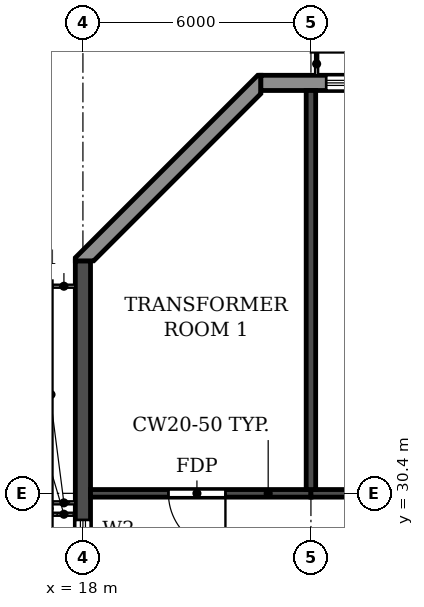
"""IFC4 building model, lengths in metres.
Left out: names, types, materials, properties, quantities, classifications, styles, units other than length and angle.
Written with IfcOpenShell. Run it as: python <this file> out.ifc"""

import sys

from ifc_helpers import new_model, si_unit, direction, frame, frame_2d, origin, place, context, subcontext, project, spatial, polyline, rectangle, outline, extrude, element, fill, save


model = new_model("IFC4")
c1 = context("Model", 3, precision=1e-05, world=origin(), true_north=direction((0.0, 1.0)))
c2 = subcontext(c1, "Body", "Model", "MODEL_VIEW")
j1 = project(units=[si_unit("LENGTHUNIT", "METRE"), si_unit("PLANEANGLEUNIT", "RADIAN")], contexts=[c1])
p1 = place(None, origin())
s1 = spatial("IfcSite", under=j1, at=p1, CompositionType="ELEMENT")
p2 = place(p1, origin())
s2 = spatial("IfcBuilding", under=s1, at=p2, CompositionType="ELEMENT")
p3 = place(p2, frame((0.0, 0.0, 267.0)))
s3 = spatial("IfcBuildingStorey", under=s2, at=p3, CompositionType="ELEMENT", Elevation=267.0)
p4 = place(p3, frame((24.0, 30.5, 0.0), z_axis=(0.0, 0.0, 1.0), x_axis=(0.0, 1.0, 0.0)))
e1 = element("IfcWall", 1, at=p4, inside=s3, PredefinedType="SHEAR", context=c2, shape_type="SweptSolid", body=[
    extrude(rectangle(XDim=10.5, YDim=0.25, at=frame_2d((5.25, 0.0))), origin(), (0.0, 0.0, 1.0), 5.15),
])
p5 = place(p3, frame((18.0, 4.683, 0.0), z_axis=(0.0, 0.0, 1.0), x_axis=(0.0, 1.0, 0.0)))
e2 = element("IfcWall", 2, at=p5, inside=s3, PredefinedType="SHEAR", context=c2, shape_type="SweptSolid", body=[
    extrude(rectangle(XDim=31.834, YDim=0.4, at=frame_2d((15.917, 0.0))), origin(), (0.0, 0.0, 1.0), 5.15),
])
p6 = place(p5, frame((23.817, 0.0, 0.9)))
e3 = element("IfcOpeningElement", 3, at=p6, cuts=e2, PredefinedType="OPENING", context=c2, shape_type="SweptSolid", body=[
    extrude(rectangle(XDim=1.2, YDim=1.5, at=frame_2d((0.6, 0.75))), frame((0.0, 0.21, 0.0), z_axis=(0.0, -1.0, 0.0), x_axis=(1.0, 0.0, 0.0)), (0.0, 0.0, 1.0), 0.42),
])
p7 = place(p5, frame((8.017, 0.0, 0.9)))
e4 = element("IfcOpeningElement", 4, at=p7, cuts=e2, PredefinedType="OPENING", context=c2, shape_type="SweptSolid", body=[
    extrude(rectangle(XDim=1.2, YDim=1.5, at=frame_2d((0.6, 0.75))), frame((0.0, 0.21, 0.0), z_axis=(0.0, -1.0, 0.0), x_axis=(1.0, 0.0, 0.0)), (0.0, 0.0, 1.0), 0.42),
])
p8 = place(p5, frame((15.917, 0.0, 0.9)))
e5 = element("IfcOpeningElement", 5, at=p8, cuts=e2, PredefinedType="OPENING", context=c2, shape_type="SweptSolid", body=[
    extrude(rectangle(XDim=1.2, YDim=1.5, at=frame_2d((0.6, 0.75))), frame((0.0, 0.21, 0.0), z_axis=(0.0, -1.0, 0.0), x_axis=(1.0, 0.0, 0.0)), (0.0, 0.0, 1.0), 0.42),
])
p9 = place(p3, frame((18.2, 30.4, 0.0), z_axis=(0.0, 0.0, 1.0), x_axis=(1.0, 0.0, 0.0)))
e6 = element("IfcWall", 6, at=p9, inside=s3, PredefinedType="SHEAR", context=c2, shape_type="SweptSolid", body=[
    extrude(rectangle(XDim=5.8, YDim=0.2, at=frame_2d((2.9, 0.0))), origin(), (0.0, 0.0, 1.0), 4.55),
])
p10 = place(p9, frame((2.05, 0.0, 0.0)))
e7 = element("IfcOpeningElement", 7, at=p10, cuts=e6, PredefinedType="OPENING", context=c2, shape_type="SweptSolid", body=[
    extrude(rectangle(XDim=1.5, YDim=2.1, at=frame_2d((0.75, 1.05))), frame((0.0, 0.11, 0.0), z_axis=(0.0, -1.0, 0.0), x_axis=(1.0, 0.0, 0.0)), (0.0, 0.0, 1.0), 0.22),
])
p11 = place(p3, frame((24.0, 30.4, 0.0), z_axis=(0.0, 0.0, 1.0), x_axis=(1.0, 0.0, 0.0)))
e8 = element("IfcWall", 8, at=p11, inside=s3, PredefinedType="SHEAR", context=c2, shape_type="SweptSolid", body=[
    extrude(rectangle(XDim=6.0, YDim=0.2, at=frame_2d((3.0, 0.0))), origin(), (0.0, 0.0, 1.0), 4.55),
])
p12 = place(p11, frame((2.25, 0.0, 0.0)))
e9 = element("IfcOpeningElement", 9, at=p12, cuts=e8, PredefinedType="OPENING", context=c2, shape_type="SweptSolid", body=[
    extrude(rectangle(XDim=1.5, YDim=2.1, at=frame_2d((0.75, 1.05))), frame((0.0, 0.11, 0.0), z_axis=(0.0, -1.0, 0.0), x_axis=(1.0, 0.0, 0.0)), (0.0, 0.0, 1.0), 0.22),
])
p13 = place(p3, frame((79.317, 41.2, 0.0), z_axis=(0.0, 0.0, 1.0), x_axis=(-1.0, 0.0, 0.0)))
e10 = element("IfcWall", 10, at=p13, inside=s3, PredefinedType="STANDARD", context=c2, shape_type="SweptSolid", body=[
    extrude(rectangle(XDim=56.634, YDim=0.4, at=frame_2d((28.317, 0.0))), origin(), (0.0, 0.0, 1.0), 5.15),
])
p14 = place(p13, frame((52.717, 0.0, 0.6)))
e11 = element("IfcOpeningElement", 11, at=p14, cuts=e10, PredefinedType="OPENING", context=c2, shape_type="SweptSolid", body=[
    extrude(rectangle(XDim=2.2, YDim=2.4, at=frame_2d((1.1, 1.2))), frame((0.0, 0.21, 0.0), z_axis=(0.0, -1.0, 0.0), x_axis=(1.0, 0.0, 0.0)), (0.0, 0.0, 1.0), 0.42),
])
p15 = place(p13, frame((49.717, 0.0, 0.6)))
e12 = element("IfcOpeningElement", 12, at=p15, cuts=e10, PredefinedType="OPENING", context=c2, shape_type="SweptSolid", body=[
    extrude(rectangle(XDim=2.2, YDim=2.4, at=frame_2d((1.1, 1.2))), frame((0.0, 0.21, 0.0), z_axis=(0.0, -1.0, 0.0), x_axis=(1.0, 0.0, 0.0)), (0.0, 0.0, 1.0), 0.42),
])
p16 = place(p13, frame((46.717, 0.0, 0.6)))
e13 = element("IfcOpeningElement", 13, at=p16, cuts=e10, PredefinedType="OPENING", context=c2, shape_type="SweptSolid", body=[
    extrude(rectangle(XDim=2.2, YDim=2.4, at=frame_2d((1.1, 1.2))), frame((0.0, 0.21, 0.0), z_axis=(0.0, -1.0, 0.0), x_axis=(1.0, 0.0, 0.0)), (0.0, 0.0, 1.0), 0.42),
])
p17 = place(p13, frame((43.717, 0.0, 0.6)))
e14 = element("IfcOpeningElement", 14, at=p17, cuts=e10, PredefinedType="OPENING", context=c2, shape_type="SweptSolid", body=[
    extrude(rectangle(XDim=2.2, YDim=2.4, at=frame_2d((1.1, 1.2))), frame((0.0, 0.21, 0.0), z_axis=(0.0, -1.0, 0.0), x_axis=(1.0, 0.0, 0.0)), (0.0, 0.0, 1.0), 0.42),
])
p18 = place(p13, frame((40.717, 0.0, 0.6)))
e15 = element("IfcOpeningElement", 15, at=p18, cuts=e10, PredefinedType="OPENING", context=c2, shape_type="SweptSolid", body=[
    extrude(rectangle(XDim=2.2, YDim=2.4, at=frame_2d((1.1, 1.2))), frame((0.0, 0.21, 0.0), z_axis=(0.0, -1.0, 0.0), x_axis=(1.0, 0.0, 0.0)), (0.0, 0.0, 1.0), 0.42),
])
p19 = place(p13, frame((37.717, 0.0, 0.6)))
e16 = element("IfcOpeningElement", 16, at=p19, cuts=e10, PredefinedType="OPENING", context=c2, shape_type="SweptSolid", body=[
    extrude(rectangle(XDim=2.2, YDim=2.4, at=frame_2d((1.1, 1.2))), frame((0.0, 0.21, 0.0), z_axis=(0.0, -1.0, 0.0), x_axis=(1.0, 0.0, 0.0)), (0.0, 0.0, 1.0), 0.42),
])
p20 = place(p13, frame((34.717, 0.0, 0.6)))
e17 = element("IfcOpeningElement", 17, at=p20, cuts=e10, PredefinedType="OPENING", context=c2, shape_type="SweptSolid", body=[
    extrude(rectangle(XDim=2.2, YDim=2.4, at=frame_2d((1.1, 1.2))), frame((0.0, 0.21, 0.0), z_axis=(0.0, -1.0, 0.0), x_axis=(1.0, 0.0, 0.0)), (0.0, 0.0, 1.0), 0.42),
])
p21 = place(p13, frame((31.717, 0.0, 0.6)))
e18 = element("IfcOpeningElement", 18, at=p21, cuts=e10, PredefinedType="OPENING", context=c2, shape_type="SweptSolid", body=[
    extrude(rectangle(XDim=2.2, YDim=2.4, at=frame_2d((1.1, 1.2))), frame((0.0, 0.21, 0.0), z_axis=(0.0, -1.0, 0.0), x_axis=(1.0, 0.0, 0.0)), (0.0, 0.0, 1.0), 0.42),
])
p22 = place(p13, frame((28.717, 0.0, 0.6)))
e19 = element("IfcOpeningElement", 19, at=p22, cuts=e10, PredefinedType="OPENING", context=c2, shape_type="SweptSolid", body=[
    extrude(rectangle(XDim=2.2, YDim=2.4, at=frame_2d((1.1, 1.2))), frame((0.0, 0.21, 0.0), z_axis=(0.0, -1.0, 0.0), x_axis=(1.0, 0.0, 0.0)), (0.0, 0.0, 1.0), 0.42),
])
p23 = place(p13, frame((25.717, 0.0, 0.6)))
e20 = element("IfcOpeningElement", 20, at=p23, cuts=e10, PredefinedType="OPENING", context=c2, shape_type="SweptSolid", body=[
    extrude(rectangle(XDim=2.2, YDim=2.4, at=frame_2d((1.1, 1.2))), frame((0.0, 0.21, 0.0), z_axis=(0.0, -1.0, 0.0), x_axis=(1.0, 0.0, 0.0)), (0.0, 0.0, 1.0), 0.42),
])
p24 = place(p13, frame((22.717, 0.0, 0.6)))
e21 = element("IfcOpeningElement", 21, at=p24, cuts=e10, PredefinedType="OPENING", context=c2, shape_type="SweptSolid", body=[
    extrude(rectangle(XDim=2.2, YDim=2.4, at=frame_2d((1.1, 1.2))), frame((0.0, 0.21, 0.0), z_axis=(0.0, -1.0, 0.0), x_axis=(1.0, 0.0, 0.0)), (0.0, 0.0, 1.0), 0.42),
])
p25 = place(p13, frame((19.717, 0.0, 0.6)))
e22 = element("IfcOpeningElement", 22, at=p25, cuts=e10, PredefinedType="OPENING", context=c2, shape_type="SweptSolid", body=[
    extrude(rectangle(XDim=2.2, YDim=2.4, at=frame_2d((1.1, 1.2))), frame((0.0, 0.21, 0.0), z_axis=(0.0, -1.0, 0.0), x_axis=(1.0, 0.0, 0.0)), (0.0, 0.0, 1.0), 0.42),
])
p26 = place(p13, frame((16.717, 0.0, 0.6)))
e23 = element("IfcOpeningElement", 23, at=p26, cuts=e10, PredefinedType="OPENING", context=c2, shape_type="SweptSolid", body=[
    extrude(rectangle(XDim=2.2, YDim=2.4, at=frame_2d((1.1, 1.2))), frame((0.0, 0.21, 0.0), z_axis=(0.0, -1.0, 0.0), x_axis=(1.0, 0.0, 0.0)), (0.0, 0.0, 1.0), 0.42),
])
p27 = place(p13, frame((13.717, 0.0, 0.6)))
e24 = element("IfcOpeningElement", 24, at=p27, cuts=e10, PredefinedType="OPENING", context=c2, shape_type="SweptSolid", body=[
    extrude(rectangle(XDim=2.2, YDim=2.4, at=frame_2d((1.1, 1.2))), frame((0.0, 0.21, 0.0), z_axis=(0.0, -1.0, 0.0), x_axis=(1.0, 0.0, 0.0)), (0.0, 0.0, 1.0), 0.42),
])
p28 = place(p13, frame((10.717, 0.0, 0.6)))
e25 = element("IfcOpeningElement", 25, at=p28, cuts=e10, PredefinedType="OPENING", context=c2, shape_type="SweptSolid", body=[
    extrude(rectangle(XDim=2.2, YDim=2.4, at=frame_2d((1.1, 1.2))), frame((0.0, 0.21, 0.0), z_axis=(0.0, -1.0, 0.0), x_axis=(1.0, 0.0, 0.0)), (0.0, 0.0, 1.0), 0.42),
])
p29 = place(p13, frame((7.717, 0.0, 0.6)))
e26 = element("IfcOpeningElement", 26, at=p29, cuts=e10, PredefinedType="OPENING", context=c2, shape_type="SweptSolid", body=[
    extrude(rectangle(XDim=2.2, YDim=2.4, at=frame_2d((1.1, 1.2))), frame((0.0, 0.21, 0.0), z_axis=(0.0, -1.0, 0.0), x_axis=(1.0, 0.0, 0.0)), (0.0, 0.0, 1.0), 0.42),
])
p30 = place(p13, frame((4.717, 0.0, 0.6)))
e27 = element("IfcOpeningElement", 27, at=p30, cuts=e10, PredefinedType="OPENING", context=c2, shape_type="SweptSolid", body=[
    extrude(rectangle(XDim=2.2, YDim=2.4, at=frame_2d((1.1, 1.2))), frame((0.0, 0.21, 0.0), z_axis=(0.0, -1.0, 0.0), x_axis=(1.0, 0.0, 0.0)), (0.0, 0.0, 1.0), 0.42),
])
p31 = place(p13, frame((1.717, 0.0, 0.6)))
e28 = element("IfcOpeningElement", 28, at=p31, cuts=e10, PredefinedType="OPENING", context=c2, shape_type="SweptSolid", body=[
    extrude(rectangle(XDim=2.2, YDim=2.4, at=frame_2d((1.1, 1.2))), frame((0.0, 0.21, 0.0), z_axis=(0.0, -1.0, 0.0), x_axis=(1.0, 0.0, 0.0)), (0.0, 0.0, 1.0), 0.42),
])
p32 = place(p3, origin())
e29 = element("IfcWall", 29, at=p32, inside=s3, PredefinedType="STANDARD", context=c2, shape_type="SweptSolid", body=[
    extrude(outline(polyline([(22.683, 41.4), (22.6, 41.4), (17.8, 36.6), (17.8, 36.517), (18.283, 36.517), (22.683, 40.917), (22.683, 41.4)])), origin(), (0.0, 0.0, 1.0), 5.15),
])
p33 = place(p14, origin())
e30 = element("IfcWindow", 30, at=p33, inside=s3, PartitioningType="TRIPLE_PANEL_HORIZONTAL", PredefinedType="WINDOW", context=c2, shape_type="SweptSolid", body=[
    extrude(rectangle(XDim=2.2, YDim=2.4, at=frame_2d((1.1, 1.2))), frame((0.0, 0.03, 0.0), z_axis=(0.0, -1.0, 0.0), x_axis=(1.0, 0.0, 0.0)), (0.0, 0.0, 1.0), 0.06),
])
fill(e11, e30)
p34 = place(p6, origin())
e31 = element("IfcWindow", 31, at=p34, inside=s3, PartitioningType="SINGLE_PANEL", PredefinedType="WINDOW", context=c2, shape_type="SweptSolid", body=[
    extrude(rectangle(XDim=1.2, YDim=1.5, at=frame_2d((0.6, 0.75))), frame((0.0, 0.03, 0.0), z_axis=(0.0, -1.0, 0.0), x_axis=(1.0, 0.0, 0.0)), (0.0, 0.0, 1.0), 0.06),
])
fill(e3, e31)
p35 = place(p10, frame((1.5, 0.0, 0.0), z_axis=(0.0, 0.0, 1.0), x_axis=(-1.0, 0.0, 0.0)))
e32 = element("IfcDoor", 32, at=p35, inside=s3, OperationType="DOUBLE_DOOR_SINGLE_SWING", PredefinedType="DOOR", context=c2, shape_type="SweptSolid", body=[
    extrude(rectangle(XDim=1.5, YDim=2.1, at=frame_2d((0.75, 1.05))), frame((0.0, 0.025, 0.0), z_axis=(0.0, -1.0, 0.0), x_axis=(1.0, 0.0, 0.0)), (0.0, 0.0, 1.0), 0.05),
])
fill(e7, e32)
save(model, sys.argv[1])
